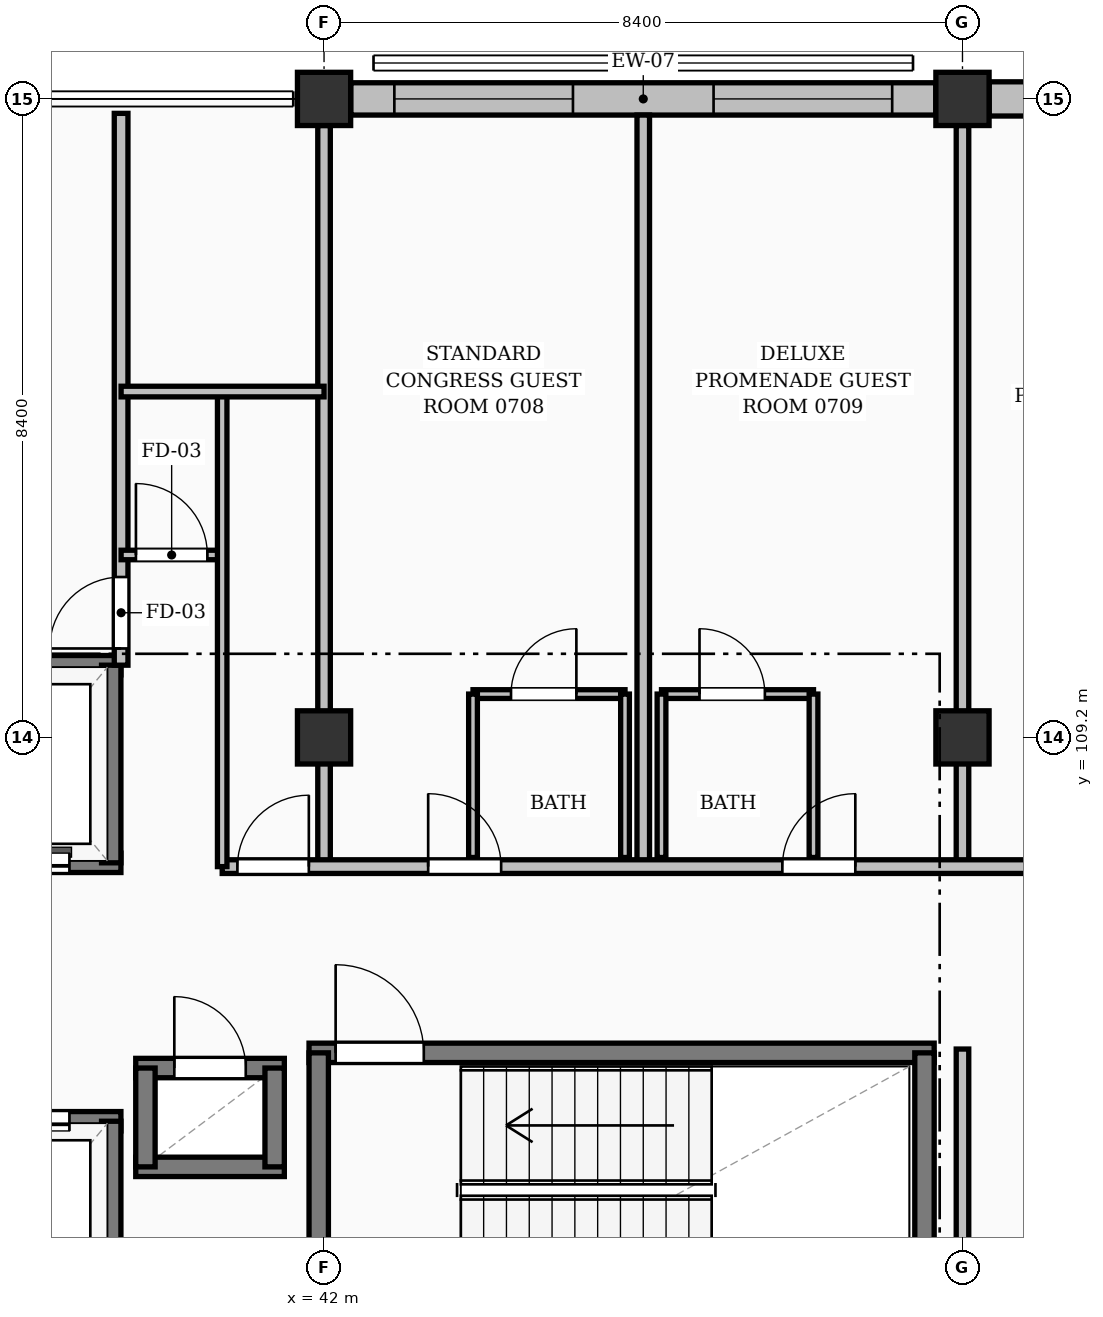
"""IFC4 building model, lengths in metres.
Left out: names, types, materials, properties, quantities, classifications, styles, units other than length and angle.
Written with IfcOpenShell. Run it as: python <this file> out.ifc"""

import sys

from ifc_helpers import new_model, si_unit, direction, frame, frame_2d, origin, origin_2d, place, context, subcontext, project, spatial, rectangle, extrude, element, fill, save


model = new_model("IFC4")
c1 = context("Model", 3, precision=1e-05, world=origin(), true_north=direction((0.0, 1.0)))
c2 = subcontext(c1, "Body", "Model", "MODEL_VIEW")
j1 = project(units=[si_unit("LENGTHUNIT", "METRE"), si_unit("PLANEANGLEUNIT", "RADIAN")], contexts=[c1])
p1 = place(None, origin())
s1 = spatial("IfcSite", under=j1, at=p1, CompositionType="ELEMENT")
p2 = place(p1, origin())
s2 = spatial("IfcBuilding", under=s1, at=p2, CompositionType="ELEMENT")
p3 = place(p2, frame((0.0, 0.0, 25.2)))
s3 = spatial("IfcBuildingStorey", under=s2, at=p3, CompositionType="ELEMENT", Elevation=25.2)
for number, where, z_axis, x_axis in (
    (1, (42.0, 109.2, 0.0), (0.0, 0.0, 1.0), (1.0, 0.0, 0.0)),
    (2, (42.0, 117.6, 0.0), (0.0, 0.0, 1.0), (1.0, 0.0, 0.0)),
    (3, (50.4, 109.2, 0.0), (0.0, 0.0, 1.0), (1.0, 0.0, 0.0)),
    (4, (50.4, 117.6, 0.0), (0.0, 0.0, 1.0), (1.0, 0.0, 0.0)),
):
    element("IfcColumn", number, at=place(p3, frame(where, z_axis=z_axis, x_axis=x_axis)), inside=s3, PredefinedType="COLUMN", context=c2, shape_type="SweptSolid", body=[
        extrude(rectangle(XDim=0.7, YDim=0.7, at=origin_2d()), origin(), (0.0, 0.0, 1.0), 3.36),
    ])
p4 = place(p3, frame((42.351, 117.6, 0.0), z_axis=(0.0, 0.0, 1.0), x_axis=(1.0, 0.0, 0.0)))
e5 = element("IfcWall", 5, at=p4, inside=s3, PredefinedType="SOLIDWALL", context=c2, shape_type="SweptSolid", body=[
    extrude(rectangle(XDim=7.698, YDim=0.425, at=frame_2d((3.849, 0.0))), origin(), (0.0, 0.0, 1.0), 2.414),
])
p5 = place(p4, frame((0.574, 0.0, 0.25)))
e6 = element("IfcOpeningElement", 6, at=p5, cuts=e5, PredefinedType="OPENING", context=c2, shape_type="SweptSolid", body=[
    extrude(rectangle(XDim=2.35, YDim=1.85, at=frame_2d((1.175, 0.925))), frame((0.0, 0.223, 0.0), z_axis=(0.0, -1.0, 0.0), x_axis=(1.0, 0.0, 0.0)), (0.0, 0.0, 1.0), 0.445),
])
p6 = place(p4, frame((4.774, 0.0, 0.25)))
e7 = element("IfcOpeningElement", 7, at=p6, cuts=e5, PredefinedType="OPENING", context=c2, shape_type="SweptSolid", body=[
    extrude(rectangle(XDim=2.35, YDim=1.95, at=frame_2d((1.175, 0.975))), frame((0.0, 0.223, 0.0), z_axis=(0.0, -1.0, 0.0), x_axis=(1.0, 0.0, 0.0)), (0.0, 0.0, 1.0), 0.445),
])
p7 = place(p3, frame((50.751, 117.6, 0.0), z_axis=(0.0, 0.0, 1.0), x_axis=(1.0, 0.0, 0.0)))
e8 = element("IfcWall", 8, at=p7, inside=s3, PredefinedType="SOLIDWALL", context=c2, shape_type="SweptSolid", body=[
    extrude(rectangle(XDim=7.698, YDim=0.45, at=frame_2d((3.849, 0.0))), origin(), (0.0, 0.0, 1.0), 2.414),
])
p8 = place(p7, frame((1.024, 0.0, 0.0)))
e9 = element("IfcOpeningElement", 9, at=p8, cuts=e8, PredefinedType="OPENING", context=c2, shape_type="SweptSolid", body=[
    extrude(rectangle(XDim=1.55, YDim=2.08, at=frame_2d((0.775, 1.04))), frame((0.0, 0.235, 0.0), z_axis=(0.0, -1.0, 0.0), x_axis=(1.0, 0.0, 0.0)), (0.0, 0.0, 1.0), 0.47),
])
p9 = place(p7, frame((4.624, 0.0, 0.25)))
e10 = element("IfcOpeningElement", 10, at=p9, cuts=e8, PredefinedType="OPENING", context=c2, shape_type="SweptSolid", body=[
    extrude(rectangle(XDim=2.35, YDim=1.95, at=frame_2d((1.175, 0.975))), frame((0.0, 0.235, 0.0), z_axis=(0.0, -1.0, 0.0), x_axis=(1.0, 0.0, 0.0)), (0.0, 0.0, 1.0), 0.47),
])
p10 = place(p3, frame((41.802, 105.05, 0.0), z_axis=(0.0, 0.0, 1.0), x_axis=(1.0, 0.0, 0.0)))
e11 = element("IfcWall", 11, at=p10, inside=s3, PredefinedType="SOLIDWALL", context=c2, shape_type="SweptSolid", body=[
    extrude(rectangle(XDim=8.225, YDim=0.255, at=frame_2d((4.113, 0.0))), origin(), (0.0, 0.0, 1.0), 3.12),
])
p11 = place(p10, frame((0.35, 0.0, 0.0)))
e12 = element("IfcOpeningElement", 12, at=p11, cuts=e11, PredefinedType="OPENING", context=c2, shape_type="SweptSolid", body=[
    extrude(rectangle(XDim=1.16, YDim=2.15, at=frame_2d((0.58, 1.075))), frame((0.0, 0.137, 0.0), z_axis=(0.0, -1.0, 0.0), x_axis=(1.0, 0.0, 0.0)), (0.0, 0.0, 1.0), 0.275),
])
for number, where, z_axis, x_axis in (
    (13, (41.93, 101.42, 0.0), (0.0, 0.0, 1.0), (0.0, 1.0, 0.0)),
    (14, (49.9, 101.42, 0.0), (0.0, 0.0, 1.0), (0.0, 1.0, 0.0)),
):
    element("IfcWall", number, at=place(p3, frame(where, z_axis=z_axis, x_axis=x_axis)), inside=s3, PredefinedType="SOLIDWALL", context=c2, shape_type="SweptSolid", body=[
        extrude(rectangle(XDim=3.63, YDim=0.255, at=frame_2d((1.815, 0.0))), origin(), (0.0, 0.0, 1.0), 3.12),
    ])
p12 = place(p3, frame((36.873, 107.55, 0.0), z_axis=(0.0, 0.0, 1.0), x_axis=(1.0, 0.0, 0.0)))
e15 = element("IfcWall", 15, at=p12, inside=s3, PredefinedType="SOLIDWALL", context=c2, shape_type="SweptSolid", body=[
    extrude(rectangle(XDim=2.455, YDim=0.255, at=frame_2d((1.228, 0.0))), origin(), (0.0, 0.0, 1.0), 3.12),
])
p13 = place(p12, frame((0.677, 0.0, 0.0)))
e16 = element("IfcOpeningElement", 16, at=p13, cuts=e15, PredefinedType="OPENING", context=c2, shape_type="SweptSolid", body=[
    extrude(rectangle(XDim=1.1, YDim=2.15, at=frame_2d((0.55, 1.075))), frame((0.0, 0.137, 0.0), z_axis=(0.0, -1.0, 0.0), x_axis=(1.0, 0.0, 0.0)), (0.0, 0.0, 1.0), 0.275),
])
p14 = place(p3, frame((36.873, 110.15, 0.0), z_axis=(0.0, 0.0, 1.0), x_axis=(1.0, 0.0, 0.0)))
e17 = element("IfcWall", 17, at=p14, inside=s3, PredefinedType="SOLIDWALL", context=c2, shape_type="SweptSolid", body=[
    extrude(rectangle(XDim=2.455, YDim=0.255, at=frame_2d((1.228, 0.0))), origin(), (0.0, 0.0, 1.0), 3.12),
])
p15 = place(p3, frame((39.2, 107.55, 0.0), z_axis=(0.0, 0.0, 1.0), x_axis=(0.0, 1.0, 0.0)))
e18 = element("IfcWall", 18, at=p15, inside=s3, PredefinedType="SOLIDWALL", context=c2, shape_type="SweptSolid", body=[
    extrude(rectangle(XDim=2.6, YDim=0.255, at=frame_2d((1.3, 0.0))), origin(), (0.0, 0.0, 1.0), 3.12),
])
p16 = place(p3, frame((36.873, 104.15, 0.0), z_axis=(0.0, 0.0, 1.0), x_axis=(1.0, 0.0, 0.0)))
e19 = element("IfcWall", 19, at=p16, inside=s3, PredefinedType="SOLIDWALL", context=c2, shape_type="SweptSolid", body=[
    extrude(rectangle(XDim=2.455, YDim=0.255, at=frame_2d((1.228, 0.0))), origin(), (0.0, 0.0, 1.0), 3.12),
])
p17 = place(p16, frame((0.677, 0.0, 0.0)))
e20 = element("IfcOpeningElement", 20, at=p17, cuts=e19, PredefinedType="OPENING", context=c2, shape_type="SweptSolid", body=[
    extrude(rectangle(XDim=1.1, YDim=2.15, at=frame_2d((0.55, 1.075))), frame((0.0, 0.137, 0.0), z_axis=(0.0, -1.0, 0.0), x_axis=(1.0, 0.0, 0.0)), (0.0, 0.0, 1.0), 0.275),
])
p18 = place(p3, frame((39.2, 101.55, 0.0), z_axis=(0.0, 0.0, 1.0), x_axis=(0.0, 1.0, 0.0)))
e21 = element("IfcWall", 21, at=p18, inside=s3, PredefinedType="SOLIDWALL", context=c2, shape_type="SweptSolid", body=[
    extrude(rectangle(XDim=2.6, YDim=0.255, at=frame_2d((1.3, 0.0))), origin(), (0.0, 0.0, 1.0), 3.12),
])
p19 = place(p3, frame((39.522, 103.55, 0.0), z_axis=(0.0, 0.0, 1.0), x_axis=(1.0, 0.0, 0.0)))
e22 = element("IfcWall", 22, at=p19, inside=s3, PredefinedType="SOLIDWALL", context=c2, shape_type="SweptSolid", body=[
    extrude(rectangle(XDim=1.955, YDim=0.255, at=frame_2d((0.978, 0.0))), origin(), (0.0, 0.0, 1.0), 3.12),
])
p20 = place(p3, frame((39.522, 104.85, 0.0), z_axis=(0.0, 0.0, 1.0), x_axis=(1.0, 0.0, 0.0)))
e23 = element("IfcWall", 23, at=p20, inside=s3, PredefinedType="SOLIDWALL", context=c2, shape_type="SweptSolid", body=[
    extrude(rectangle(XDim=1.955, YDim=0.255, at=frame_2d((0.978, 0.0))), origin(), (0.0, 0.0, 1.0), 3.12),
])
p21 = place(p20, frame((0.508, 0.0, 0.0)))
e24 = element("IfcOpeningElement", 24, at=p21, cuts=e23, PredefinedType="OPENING", context=c2, shape_type="SweptSolid", body=[
    extrude(rectangle(XDim=0.94, YDim=2.1, at=frame_2d((0.47, 1.05))), frame((0.0, 0.137, 0.0), z_axis=(0.0, -1.0, 0.0), x_axis=(1.0, 0.0, 0.0)), (0.0, 0.0, 1.0), 0.275),
])
for number, where, z_axis, x_axis in (
    (25, (39.65, 103.55, 0.0), (0.0, 0.0, 1.0), (0.0, 1.0, 0.0)),
    (26, (41.35, 103.55, 0.0), (0.0, 0.0, 1.0), (0.0, 1.0, 0.0)),
):
    element("IfcWall", number, at=place(p3, frame(where, z_axis=z_axis, x_axis=x_axis)), inside=s3, PredefinedType="SOLIDWALL", context=c2, shape_type="SweptSolid", body=[
        extrude(rectangle(XDim=1.3, YDim=0.255, at=frame_2d((0.65, 0.0))), origin(), (0.0, 0.0, 1.0), 3.12),
    ])
p22 = place(p3, frame((43.96, 109.77, 0.0), z_axis=(0.0, 0.0, 1.0), x_axis=(1.0, 0.0, 0.0)))
e27 = element("IfcWall", 27, at=p22, inside=s3, PredefinedType="PARTITIONING", context=c2, shape_type="SweptSolid", body=[
    extrude(rectangle(XDim=2.0, YDim=0.115, at=frame_2d((1.0, 0.0))), origin(), (0.0, 0.0, 1.0), 3.12),
])
p23 = place(p22, frame((0.5, 0.0, 0.0)))
e28 = element("IfcOpeningElement", 28, at=p23, cuts=e27, PredefinedType="OPENING", context=c2, shape_type="SweptSolid", body=[
    extrude(rectangle(XDim=0.86, YDim=2.05, at=frame_2d((0.43, 1.025))), frame((0.0, 0.067, 0.0), z_axis=(0.0, -1.0, 0.0), x_axis=(1.0, 0.0, 0.0)), (0.0, 0.0, 1.0), 0.135),
])
for number, where, z_axis, x_axis in (
    (29, (43.96, 107.62, 0.0), (0.0, 0.0, 1.0), (0.0, 1.0, 0.0)),
    (30, (45.96, 107.62, 0.0), (0.0, 0.0, 1.0), (0.0, 1.0, 0.0)),
):
    element("IfcWall", number, at=place(p3, frame(where, z_axis=z_axis, x_axis=x_axis)), inside=s3, PredefinedType="PARTITIONING", context=c2, shape_type="SweptSolid", body=[
        extrude(rectangle(XDim=2.15, YDim=0.115, at=frame_2d((1.075, 0.0))), origin(), (0.0, 0.0, 1.0), 3.12),
    ])
p24 = place(p3, frame((46.44, 109.77, 0.0), z_axis=(0.0, 0.0, 1.0), x_axis=(1.0, 0.0, 0.0)))
e31 = element("IfcWall", 31, at=p24, inside=s3, PredefinedType="PARTITIONING", context=c2, shape_type="SweptSolid", body=[
    extrude(rectangle(XDim=2.0, YDim=0.115, at=frame_2d((1.0, 0.0))), origin(), (0.0, 0.0, 1.0), 3.12),
])
p25 = place(p24, frame((0.5, 0.0, 0.0)))
e32 = element("IfcOpeningElement", 32, at=p25, cuts=e31, PredefinedType="OPENING", context=c2, shape_type="SweptSolid", body=[
    extrude(rectangle(XDim=0.86, YDim=2.05, at=frame_2d((0.43, 1.025))), frame((0.0, 0.067, 0.0), z_axis=(0.0, -1.0, 0.0), x_axis=(1.0, 0.0, 0.0)), (0.0, 0.0, 1.0), 0.135),
])
for number, where, z_axis, x_axis in (
    (33, (46.44, 107.62, 0.0), (0.0, 0.0, 1.0), (0.0, 1.0, 0.0)),
    (34, (48.44, 107.62, 0.0), (0.0, 0.0, 1.0), (0.0, 1.0, 0.0)),
):
    element("IfcWall", number, at=place(p3, frame(where, z_axis=z_axis, x_axis=x_axis)), inside=s3, PredefinedType="PARTITIONING", context=c2, shape_type="SweptSolid", body=[
        extrude(rectangle(XDim=2.15, YDim=0.115, at=frame_2d((1.075, 0.0))), origin(), (0.0, 0.0, 1.0), 3.12),
    ])
p26 = place(p3, frame((46.2, 107.5, 0.0), z_axis=(0.0, 0.0, 1.0), x_axis=(0.0, 1.0, 0.0)))
e35 = element("IfcWall", 35, at=p26, inside=s3, PredefinedType="PARTITIONING", context=c2, shape_type="SweptSolid", body=[
    extrude(rectangle(XDim=9.887, YDim=0.165, at=frame_2d((4.944, 0.0))), origin(), (0.0, 0.0, 1.0), 3.12),
])
for number, where, z_axis, x_axis in (
    (36, (42.0, 107.5, 0.0), (0.0, 0.0, 1.0), (0.0, 1.0, 0.0)),
    (37, (50.4, 107.5, 0.0), (0.0, 0.0, 1.0), (0.0, 1.0, 0.0)),
):
    element("IfcWall", number, at=place(p3, frame(where, z_axis=z_axis, x_axis=x_axis)), inside=s3, PredefinedType="PARTITIONING", context=c2, shape_type="SweptSolid", body=[
        extrude(rectangle(XDim=9.75, YDim=0.165, at=frame_2d((4.875, 0.0))), origin(), (0.0, 0.0, 1.0), 2.013),
    ])
p27 = place(p3, frame((40.66, 107.5, 0.0), z_axis=(0.0, 0.0, 1.0), x_axis=(1.0, 0.0, 0.0)))
e38 = element("IfcWall", 38, at=p27, inside=s3, PredefinedType="PARTITIONING", context=c2, shape_type="SweptSolid", body=[
    extrude(rectangle(XDim=26.39, YDim=0.18, at=frame_2d((13.195, 0.0))), origin(), (0.0, 0.0, 1.0), 3.12),
])
p28 = place(p27, frame((0.2, 0.0, 0.0)))
e39 = element("IfcOpeningElement", 39, at=p28, cuts=e38, PredefinedType="OPENING", context=c2, shape_type="SweptSolid", body=[
    extrude(rectangle(XDim=0.94, YDim=2.1, at=frame_2d((0.47, 1.05))), frame((0.0, 0.1, 0.0), z_axis=(0.0, -1.0, 0.0), x_axis=(1.0, 0.0, 0.0)), (0.0, 0.0, 1.0), 0.2),
])
p29 = place(p27, frame((2.71, 0.0, 0.0)))
e40 = element("IfcOpeningElement", 40, at=p29, cuts=e38, PredefinedType="OPENING", context=c2, shape_type="SweptSolid", body=[
    extrude(rectangle(XDim=0.96, YDim=2.15, at=frame_2d((0.48, 1.075))), frame((0.0, 0.1, 0.0), z_axis=(0.0, -1.0, 0.0), x_axis=(1.0, 0.0, 0.0)), (0.0, 0.0, 1.0), 0.2),
])
p30 = place(p27, frame((7.37, 0.0, 0.0)))
e41 = element("IfcOpeningElement", 41, at=p30, cuts=e38, PredefinedType="OPENING", context=c2, shape_type="SweptSolid", body=[
    extrude(rectangle(XDim=0.96, YDim=2.15, at=frame_2d((0.48, 1.075))), frame((0.0, 0.1, 0.0), z_axis=(0.0, -1.0, 0.0), x_axis=(1.0, 0.0, 0.0)), (0.0, 0.0, 1.0), 0.2),
])
p31 = place(p27, frame((11.11, 0.0, 0.0)))
e42 = element("IfcOpeningElement", 42, at=p31, cuts=e38, PredefinedType="OPENING", context=c2, shape_type="SweptSolid", body=[
    extrude(rectangle(XDim=0.96, YDim=2.15, at=frame_2d((0.48, 1.075))), frame((0.0, 0.1, 0.0), z_axis=(0.0, -1.0, 0.0), x_axis=(1.0, 0.0, 0.0)), (0.0, 0.0, 1.0), 0.2),
])
p32 = place(p27, frame((15.77, 0.0, 0.0)))
e43 = element("IfcOpeningElement", 43, at=p32, cuts=e38, PredefinedType="OPENING", context=c2, shape_type="SweptSolid", body=[
    extrude(rectangle(XDim=0.96, YDim=2.15, at=frame_2d((0.48, 1.075))), frame((0.0, 0.1, 0.0), z_axis=(0.0, -1.0, 0.0), x_axis=(1.0, 0.0, 0.0)), (0.0, 0.0, 1.0), 0.2),
])
p33 = place(p27, frame((19.64, 0.0, 0.0)))
e44 = element("IfcOpeningElement", 44, at=p33, cuts=e38, PredefinedType="OPENING", context=c2, shape_type="SweptSolid", body=[
    extrude(rectangle(XDim=1.02, YDim=2.15, at=frame_2d((0.51, 1.075))), frame((0.0, 0.1, 0.0), z_axis=(0.0, -1.0, 0.0), x_axis=(1.0, 0.0, 0.0)), (0.0, 0.0, 1.0), 0.2),
])
p34 = place(p3, frame((39.33, 110.15, 0.0), z_axis=(0.0, 0.0, 1.0), x_axis=(0.0, 1.0, 0.0)))
e45 = element("IfcWall", 45, at=p34, inside=s3, PredefinedType="PARTITIONING", context=c2, shape_type="SweptSolid", body=[
    extrude(rectangle(XDim=7.26, YDim=0.18, at=frame_2d((3.63, 0.0))), origin(), (0.0, 0.0, 1.0), 3.12),
])
p35 = place(p34, frame((0.22, 0.0, 0.0)))
e46 = element("IfcOpeningElement", 46, at=p35, cuts=e45, PredefinedType="OPENING", context=c2, shape_type="SweptSolid", body=[
    extrude(rectangle(XDim=0.94, YDim=2.1, at=frame_2d((0.47, 1.05))), frame((0.0, 0.1, 0.0), z_axis=(0.0, -1.0, 0.0), x_axis=(1.0, 0.0, 0.0)), (0.0, 0.0, 1.0), 0.2),
])
p36 = place(p3, frame((39.33, 111.6, 0.0), z_axis=(0.0, 0.0, 1.0), x_axis=(1.0, 0.0, 0.0)))
e47 = element("IfcWall", 47, at=p36, inside=s3, PredefinedType="PARTITIONING", context=c2, shape_type="SweptSolid", body=[
    extrude(rectangle(XDim=1.33, YDim=0.125, at=frame_2d((0.665, 0.0))), origin(), (0.0, 0.0, 1.0), 3.12),
])
p37 = place(p36, frame((0.195, 0.0, 0.0)))
e48 = element("IfcOpeningElement", 48, at=p37, cuts=e47, PredefinedType="OPENING", context=c2, shape_type="SweptSolid", body=[
    extrude(rectangle(XDim=0.94, YDim=2.1, at=frame_2d((0.47, 1.05))), frame((0.0, 0.073, 0.0), z_axis=(0.0, -1.0, 0.0), x_axis=(1.0, 0.0, 0.0)), (0.0, 0.0, 1.0), 0.145),
])
p38 = place(p3, frame((40.66, 107.5, 0.0), z_axis=(0.0, 0.0, 1.0), x_axis=(0.0, 1.0, 0.0)))
e49 = element("IfcWall", 49, at=p38, inside=s3, PredefinedType="PARTITIONING", context=c2, shape_type="SweptSolid", body=[
    extrude(rectangle(XDim=6.25, YDim=0.125, at=frame_2d((3.125, 0.0))), origin(), (0.0, 0.0, 1.0), 3.12),
])
p39 = place(p3, frame((39.33, 113.75, 0.0), z_axis=(0.0, 0.0, 1.0), x_axis=(1.0, 0.0, 0.0)))
e50 = element("IfcWall", 50, at=p39, inside=s3, PredefinedType="PARTITIONING", context=c2, shape_type="SweptSolid", body=[
    extrude(rectangle(XDim=2.67, YDim=0.14, at=frame_2d((1.335, 0.0))), origin(), (0.0, 0.0, 1.0), 3.12),
])
p40 = place(p3, frame((50.4, 92.75, 0.0), z_axis=(0.0, 0.0, 1.0), x_axis=(0.0, 1.0, 0.0)))
e51 = element("IfcWall", 51, at=p40, inside=s3, PredefinedType="PARTITIONING", context=c2, shape_type="SweptSolid", body=[
    extrude(rectangle(XDim=12.35, YDim=0.165, at=frame_2d((6.175, 0.0))), origin(), (0.0, 0.0, 1.0), 2.455),
])
p41 = place(p5, origin())
e52 = element("IfcWindow", 52, at=p41, inside=s3, PartitioningType="DOUBLE_PANEL_VERTICAL", PredefinedType="WINDOW", context=c2, shape_type="SweptSolid", body=[
    extrude(rectangle(XDim=2.35, YDim=1.85, at=frame_2d((1.175, 0.925))), frame((0.0, 0.03, 0.0), z_axis=(0.0, -1.0, 0.0), x_axis=(1.0, 0.0, 0.0)), (0.0, 0.0, 1.0), 0.06),
])
fill(e6, e52)
p42 = place(p6, origin())
e53 = element("IfcWindow", 53, at=p42, inside=s3, PartitioningType="DOUBLE_PANEL_VERTICAL", PredefinedType="WINDOW", context=c2, shape_type="SweptSolid", body=[
    extrude(rectangle(XDim=2.35, YDim=1.95, at=frame_2d((1.175, 0.975))), frame((0.0, 0.03, 0.0), z_axis=(0.0, -1.0, 0.0), x_axis=(1.0, 0.0, 0.0)), (0.0, 0.0, 1.0), 0.06),
])
fill(e7, e53)
p43 = place(p11, origin())
e54 = element("IfcDoor", 54, at=p43, inside=s3, OperationType="SINGLE_SWING_LEFT", PredefinedType="DOOR", context=c2, shape_type="SweptSolid", body=[
    extrude(rectangle(XDim=1.16, YDim=2.15, at=frame_2d((0.58, 1.075))), frame((0.0, 0.025, 0.0), z_axis=(0.0, -1.0, 0.0), x_axis=(1.0, 0.0, 0.0)), (0.0, 0.0, 1.0), 0.05),
])
fill(e12, e54)
p44 = place(p13, origin())
e55 = element("IfcDoor", 55, at=p44, inside=s3, OperationType="DOUBLE_DOOR_SLIDING", PredefinedType="DOOR", context=c2, shape_type="SweptSolid", body=[
    extrude(rectangle(XDim=1.1, YDim=2.15, at=frame_2d((0.55, 1.075))), frame((0.0, 0.025, 0.0), z_axis=(0.0, -1.0, 0.0), x_axis=(1.0, 0.0, 0.0)), (0.0, 0.0, 1.0), 0.05),
])
fill(e16, e55)
p45 = place(p17, origin())
e56 = element("IfcDoor", 56, at=p45, inside=s3, OperationType="DOUBLE_DOOR_SLIDING", PredefinedType="DOOR", context=c2, shape_type="SweptSolid", body=[
    extrude(rectangle(XDim=1.1, YDim=2.15, at=frame_2d((0.55, 1.075))), frame((0.0, 0.025, 0.0), z_axis=(0.0, -1.0, 0.0), x_axis=(1.0, 0.0, 0.0)), (0.0, 0.0, 1.0), 0.05),
])
fill(e20, e56)
p46 = place(p21, origin())
e57 = element("IfcDoor", 57, at=p46, inside=s3, OperationType="SINGLE_SWING_LEFT", PredefinedType="DOOR", context=c2, shape_type="SweptSolid", body=[
    extrude(rectangle(XDim=0.94, YDim=2.1, at=frame_2d((0.47, 1.05))), frame((0.0, 0.025, 0.0), z_axis=(0.0, -1.0, 0.0), x_axis=(1.0, 0.0, 0.0)), (0.0, 0.0, 1.0), 0.05),
])
fill(e24, e57)
p47 = place(p23, origin())
e58 = element("IfcDoor", 58, at=p47, inside=s3, OperationType="SINGLE_SWING_RIGHT", PredefinedType="DOOR", context=c2, shape_type="SweptSolid", body=[
    extrude(rectangle(XDim=0.86, YDim=2.05, at=frame_2d((0.43, 1.025))), frame((0.0, 0.025, 0.0), z_axis=(0.0, -1.0, 0.0), x_axis=(1.0, 0.0, 0.0)), (0.0, 0.0, 1.0), 0.05),
])
fill(e28, e58)
p48 = place(p25, origin())
e59 = element("IfcDoor", 59, at=p48, inside=s3, OperationType="SINGLE_SWING_LEFT", PredefinedType="DOOR", context=c2, shape_type="SweptSolid", body=[
    extrude(rectangle(XDim=0.86, YDim=2.05, at=frame_2d((0.43, 1.025))), frame((0.0, 0.025, 0.0), z_axis=(0.0, -1.0, 0.0), x_axis=(1.0, 0.0, 0.0)), (0.0, 0.0, 1.0), 0.05),
])
fill(e32, e59)
p49 = place(p28, origin())
e60 = element("IfcDoor", 60, at=p49, inside=s3, OperationType="SINGLE_SWING_RIGHT", PredefinedType="DOOR", context=c2, shape_type="SweptSolid", body=[
    extrude(rectangle(XDim=0.94, YDim=2.1, at=frame_2d((0.47, 1.05))), frame((0.0, 0.025, 0.0), z_axis=(0.0, -1.0, 0.0), x_axis=(1.0, 0.0, 0.0)), (0.0, 0.0, 1.0), 0.05),
])
fill(e39, e60)
p50 = place(p29, origin())
e61 = element("IfcDoor", 61, at=p50, inside=s3, OperationType="SINGLE_SWING_LEFT", PredefinedType="DOOR", context=c2, shape_type="SweptSolid", body=[
    extrude(rectangle(XDim=0.96, YDim=2.15, at=frame_2d((0.48, 1.075))), frame((0.0, 0.025, 0.0), z_axis=(0.0, -1.0, 0.0), x_axis=(1.0, 0.0, 0.0)), (0.0, 0.0, 1.0), 0.05),
])
fill(e40, e61)
p51 = place(p30, origin())
e62 = element("IfcDoor", 62, at=p51, inside=s3, OperationType="SINGLE_SWING_RIGHT", PredefinedType="DOOR", context=c2, shape_type="SweptSolid", body=[
    extrude(rectangle(XDim=0.96, YDim=2.15, at=frame_2d((0.48, 1.075))), frame((0.0, 0.025, 0.0), z_axis=(0.0, -1.0, 0.0), x_axis=(1.0, 0.0, 0.0)), (0.0, 0.0, 1.0), 0.05),
])
fill(e41, e62)
p52 = place(p35, origin())
e63 = element("IfcDoor", 63, at=p52, inside=s3, OperationType="SINGLE_SWING_LEFT", PredefinedType="DOOR", context=c2, shape_type="SweptSolid", body=[
    extrude(rectangle(XDim=0.94, YDim=2.1, at=frame_2d((0.47, 1.05))), frame((0.0, 0.025, 0.0), z_axis=(0.0, -1.0, 0.0), x_axis=(1.0, 0.0, 0.0)), (0.0, 0.0, 1.0), 0.05),
])
fill(e46, e63)
p53 = place(p37, origin())
e64 = element("IfcDoor", 64, at=p53, inside=s3, OperationType="SINGLE_SWING_LEFT", PredefinedType="DOOR", context=c2, shape_type="SweptSolid", body=[
    extrude(rectangle(XDim=0.94, YDim=2.1, at=frame_2d((0.47, 1.05))), frame((0.0, 0.025, 0.0), z_axis=(0.0, -1.0, 0.0), x_axis=(1.0, 0.0, 0.0)), (0.0, 0.0, 1.0), 0.05),
])
fill(e48, e64)
save(model, sys.argv[1])
